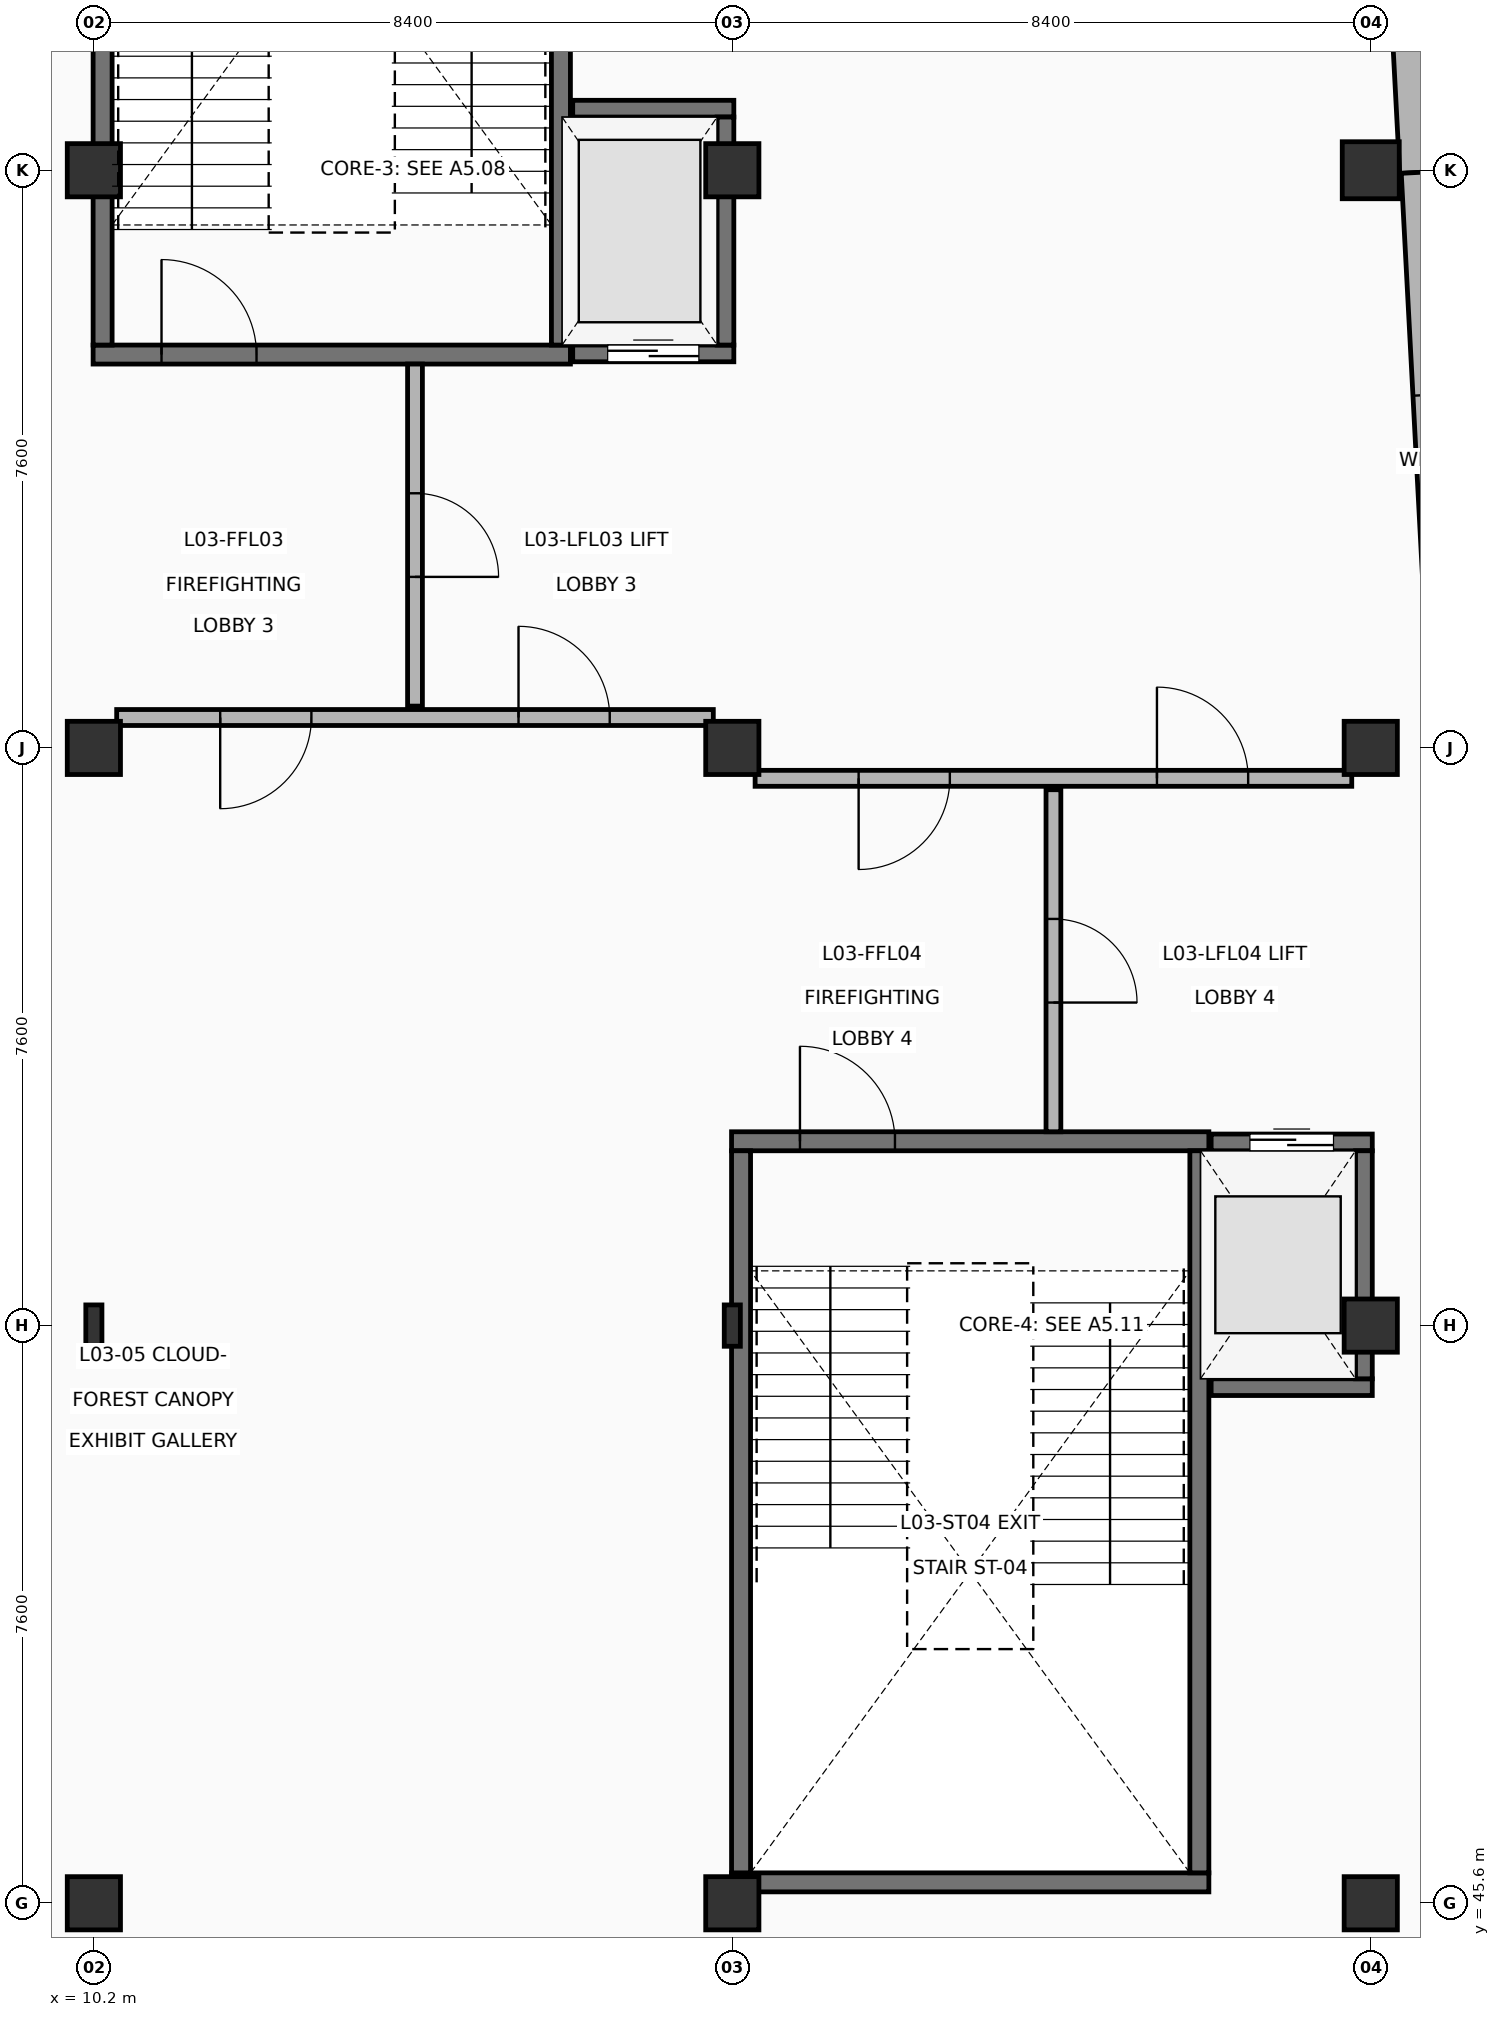
"""IFC4 building model, lengths in metres.
Left out: names, types, materials, properties, quantities, classifications, styles, units other than length and angle.
Written with IfcOpenShell. Run it as: python <this file> out.ifc"""

import sys

from ifc_helpers import new_model, si_unit, direction, frame, frame_2d, origin, origin_2d, place, context, subcontext, project, spatial, rectangle, circle, i_section, extrude, element, fill, save


model = new_model("IFC4")
c1 = context("Model", 3, precision=1e-05, world=origin(), true_north=direction((0.0, 1.0)))
c2 = subcontext(c1, "Body", "Model", "MODEL_VIEW")
j1 = project(units=[si_unit("LENGTHUNIT", "METRE"), si_unit("PLANEANGLEUNIT", "RADIAN")], contexts=[c1])
p1 = place(None, origin())
s1 = spatial("IfcSite", under=j1, at=p1, CompositionType="ELEMENT")
p2 = place(p1, origin())
s2 = spatial("IfcBuilding", under=s1, at=p2, CompositionType="ELEMENT")
p3 = place(p2, frame((0.0, 0.0, 10.5)))
s3 = spatial("IfcBuildingStorey", under=s2, at=p3, CompositionType="ELEMENT", Elevation=10.5)
p4 = place(p3, frame((10.2, 45.6, 0.0), z_axis=(0.0, 0.0, 1.0), x_axis=(1.0, 0.0, 0.0)))
e1 = element("IfcColumn", 1, at=p4, inside=s3, PredefinedType="COLUMN", context=c2, shape_type="SweptSolid", body=[
    extrude(rectangle(XDim=0.7, YDim=0.7, at=origin_2d()), origin(), (0.0, 0.0, 1.0), 4.8),
])
p5 = place(p3, frame((10.2, 53.2, 0.0), z_axis=(0.0, 0.0, 1.0), x_axis=(1.0, 0.0, 0.0)))
e2 = element("IfcColumn", 2, at=p5, inside=s3, PredefinedType="COLUMN", context=c2, shape_type="SweptSolid", body=[
    extrude(i_section(OverallWidth=0.212, OverallDepth=0.544, WebThickness=0.013, FlangeThickness=0.021, at=origin_2d()), origin(), (0.0, 0.0, 1.0), 4.8),
])
for number, where, z_axis, x_axis in (
    (3, (10.2, 60.8, 0.0), (0.0, 0.0, 1.0), (1.0, 0.0, 0.0)),
    (4, (10.2, 68.4, 0.0), (0.0, 0.0, 1.0), (1.0, 0.0, 0.0)),
    (5, (18.6, 45.6, 0.0), (0.0, 0.0, 1.0), (1.0, 0.0, 0.0)),
):
    element("IfcColumn", number, at=place(p3, frame(where, z_axis=z_axis, x_axis=x_axis)), inside=s3, PredefinedType="COLUMN", context=c2, shape_type="SweptSolid", body=[
        extrude(rectangle(XDim=0.7, YDim=0.7, at=origin_2d()), origin(), (0.0, 0.0, 1.0), 4.8),
    ])
p6 = place(p3, frame((18.6, 53.2, 0.0), z_axis=(0.0, 0.0, 1.0), x_axis=(1.0, 0.0, 0.0)))
e6 = element("IfcColumn", 6, at=p6, inside=s3, PredefinedType="COLUMN", context=c2, shape_type="SweptSolid", body=[
    extrude(i_section(OverallWidth=0.212, OverallDepth=0.544, WebThickness=0.013, FlangeThickness=0.021, at=origin_2d()), origin(), (0.0, 0.0, 1.0), 4.8),
])
for number, where, z_axis, x_axis in (
    (7, (18.6, 60.8, 0.0), (0.0, 0.0, 1.0), (1.0, 0.0, 0.0)),
    (8, (18.6, 68.4, 0.0), (0.0, 0.0, 1.0), (1.0, 0.0, 0.0)),
    (9, (27.0, 45.6, 0.0), (0.0, 0.0, 1.0), (1.0, 0.0, 0.0)),
    (10, (27.0, 53.2, 0.0), (0.0, 0.0, 1.0), (1.0, 0.0, 0.0)),
    (11, (27.0, 60.8, 0.0), (0.0, 0.0, 1.0), (1.0, 0.0, 0.0)),
):
    element("IfcColumn", number, at=place(p3, frame(where, z_axis=z_axis, x_axis=x_axis)), inside=s3, PredefinedType="COLUMN", context=c2, shape_type="SweptSolid", body=[
        extrude(rectangle(XDim=0.7, YDim=0.7, at=origin_2d()), origin(), (0.0, 0.0, 1.0), 4.8),
    ])
p7 = place(p3, frame((27.0, 68.4, 0.0), z_axis=(0.0, 0.0, 1.0), x_axis=(1.0, 0.0, 0.0)))
e12 = element("IfcColumn", 12, at=p7, inside=s3, PredefinedType="COLUMN", context=c2, shape_type="SweptSolid", body=[
    extrude(circle(Radius=0.375, at=origin_2d()), origin(), (0.0, 0.0, 1.0), 4.8),
])
p8 = place(p3, frame((27.209, 75.637, 0.0), z_axis=(0.0, 0.0, 1.0), x_axis=(0.05249721114, -0.998621070688, 0.0)))
e13 = element("IfcWall", 13, at=p8, inside=s3, PredefinedType="SOLIDWALL", context=c2, shape_type="SweptSolid", body=[
    extrude(rectangle(XDim=7.278, YDim=0.42, at=frame_2d((3.639, 0.0))), origin(), (0.0, 0.0, 1.0), 4.59),
])
p9 = place(p8, frame((2.839, 0.0, 0.95)))
e14 = element("IfcOpeningElement", 14, at=p9, cuts=e13, PredefinedType="OPENING", context=c2, shape_type="SweptSolid", body=[
    extrude(rectangle(XDim=1.6, YDim=2.05, at=frame_2d((0.8, 1.025))), frame((0.0, 0.22, 0.0), z_axis=(0.0, -1.0, 0.0), x_axis=(1.0, 0.0, 0.0)), (0.0, 0.0, 1.0), 0.44),
])
p10 = place(p3, frame((27.601, 68.37, 0.0), z_axis=(0.0, 0.0, 1.0), x_axis=(0.052545363492, -0.998618538169, 0.0)))
e15 = element("IfcWall", 15, at=p10, inside=s3, PredefinedType="SOLIDWALL", context=c2, shape_type="SweptSolid", body=[
    extrude(rectangle(XDim=7.611, YDim=0.4, at=frame_2d((3.805, 0.0))), origin(), (0.0, 0.0, 1.0), 4.56),
])
p11 = place(p10, frame((2.93, 0.0, 0.95)))
e16 = element("IfcOpeningElement", 16, at=p11, cuts=e15, PredefinedType="OPENING", context=c2, shape_type="SweptSolid", body=[
    extrude(rectangle(XDim=1.75, YDim=2.15, at=frame_2d((0.875, 1.075))), frame((0.0, 0.21, 0.0), z_axis=(0.0, -1.0, 0.0), x_axis=(1.0, 0.0, 0.0)), (0.0, 0.0, 1.0), 0.42),
])
p12 = place(p3, frame((10.19, 65.975, 0.0), z_axis=(0.0, 0.0, 1.0), x_axis=(1.0, 0.0, 0.0)))
e17 = element("IfcWall", 17, at=p12, inside=s3, PredefinedType="SHEAR", context=c2, shape_type="SweptSolid", body=[
    extrude(rectangle(XDim=6.28, YDim=0.25, at=frame_2d((3.14, 0.0))), origin(), (0.0, 0.0, 1.0), 4.59),
])
p13 = place(p12, frame((0.9, 0.0, 0.0)))
e18 = element("IfcOpeningElement", 18, at=p13, cuts=e17, PredefinedType="OPENING", context=c2, shape_type="SweptSolid", body=[
    extrude(rectangle(XDim=1.25, YDim=2.2, at=frame_2d((0.625, 1.1))), frame((0.0, 0.135, 0.0), z_axis=(0.0, -1.0, 0.0), x_axis=(1.0, 0.0, 0.0)), (0.0, 0.0, 1.0), 0.27),
])
for number, where, z_axis, x_axis in (
    (19, (10.315, 66.1, 0.0), (0.0, 0.0, 1.0), (0.0, 1.0, 0.0)),
    (20, (16.345, 66.1, 0.0), (0.0, 0.0, 1.0), (0.0, 1.0, 0.0)),
):
    element("IfcWall", number, at=place(p3, frame(where, z_axis=z_axis, x_axis=x_axis)), inside=s3, PredefinedType="SHEAR", context=c2, shape_type="SweptSolid", body=[
        extrude(rectangle(XDim=9.5, YDim=0.25, at=frame_2d((4.75, 0.0))), origin(), (0.0, 0.0, 1.0), 4.59),
    ])
p14 = place(p3, frame((16.5, 65.99, 0.0), z_axis=(0.0, 0.0, 1.0), x_axis=(1.0, 0.0, 0.0)))
e21 = element("IfcWall", 21, at=p14, inside=s3, PredefinedType="SHEAR", context=c2, shape_type="SweptSolid", body=[
    extrude(rectangle(XDim=2.12, YDim=0.22, at=frame_2d((1.06, 0.0))), origin(), (0.0, 0.0, 1.0), 4.59),
])
p15 = place(p14, frame((0.46, 0.0, 0.0)))
e22 = element("IfcOpeningElement", 22, at=p15, cuts=e21, PredefinedType="OPENING", context=c2, shape_type="SweptSolid", body=[
    extrude(rectangle(XDim=1.2, YDim=2.2, at=frame_2d((0.6, 1.1))), frame((0.0, 0.12, 0.0), z_axis=(0.0, -1.0, 0.0), x_axis=(1.0, 0.0, 0.0)), (0.0, 0.0, 1.0), 0.24),
])
p16 = place(p3, frame((16.5, 69.21, 0.0), z_axis=(0.0, 0.0, 1.0), x_axis=(1.0, 0.0, 0.0)))
e23 = element("IfcWall", 23, at=p16, inside=s3, PredefinedType="SHEAR", context=c2, shape_type="SweptSolid", body=[
    extrude(rectangle(XDim=2.12, YDim=0.22, at=frame_2d((1.06, 0.0))), origin(), (0.0, 0.0, 1.0), 4.59),
])
p17 = place(p3, frame((18.51, 66.1, 0.0), z_axis=(0.0, 0.0, 1.0), x_axis=(0.0, 1.0, 0.0)))
e24 = element("IfcWall", 24, at=p17, inside=s3, PredefinedType="SHEAR", context=c2, shape_type="SweptSolid", body=[
    extrude(rectangle(XDim=3.0, YDim=0.22, at=frame_2d((1.5, 0.0))), origin(), (0.0, 0.0, 1.0), 4.59),
])
p18 = place(p3, frame((10.5, 61.2, 0.0), z_axis=(0.0, 0.0, 1.0), x_axis=(1.0, 0.0, 0.0)))
e25 = element("IfcWall", 25, at=p18, inside=s3, PredefinedType="PARTITIONING", context=c2, shape_type="SweptSolid", body=[
    extrude(rectangle(XDim=7.85, YDim=0.21, at=frame_2d((3.925, 0.0))), origin(), (0.0, 0.0, 1.0), 4.59),
])
p19 = place(p18, frame((1.362, 0.0, 0.0)))
e26 = element("IfcOpeningElement", 26, at=p19, cuts=e25, PredefinedType="OPENING", context=c2, shape_type="SweptSolid", body=[
    extrude(rectangle(XDim=1.2, YDim=2.2, at=frame_2d((0.6, 1.1))), frame((0.0, 0.115, 0.0), z_axis=(0.0, -1.0, 0.0), x_axis=(1.0, 0.0, 0.0)), (0.0, 0.0, 1.0), 0.23),
])
p20 = place(p18, frame((5.287, 0.0, 0.0)))
e27 = element("IfcOpeningElement", 27, at=p20, cuts=e25, PredefinedType="OPENING", context=c2, shape_type="SweptSolid", body=[
    extrude(rectangle(XDim=1.2, YDim=2.2, at=frame_2d((0.6, 1.1))), frame((0.0, 0.115, 0.0), z_axis=(0.0, -1.0, 0.0), x_axis=(1.0, 0.0, 0.0)), (0.0, 0.0, 1.0), 0.23),
])
p21 = place(p3, frame((14.425, 61.35, 0.0), z_axis=(0.0, 0.0, 1.0), x_axis=(0.0, 1.0, 0.0)))
e28 = element("IfcWall", 28, at=p21, inside=s3, PredefinedType="PARTITIONING", context=c2, shape_type="SweptSolid", body=[
    extrude(rectangle(XDim=4.5, YDim=0.195, at=frame_2d((2.25, 0.0))), origin(), (0.0, 0.0, 1.0), 4.59),
])
p22 = place(p21, frame((1.7, 0.0, 0.0)))
e29 = element("IfcOpeningElement", 29, at=p22, cuts=e28, PredefinedType="OPENING", context=c2, shape_type="SweptSolid", body=[
    extrude(rectangle(XDim=1.1, YDim=2.15, at=frame_2d((0.55, 1.075))), frame((0.0, 0.107, 0.0), z_axis=(0.0, -1.0, 0.0), x_axis=(1.0, 0.0, 0.0)), (0.0, 0.0, 1.0), 0.215),
])
p23 = place(p3, frame((18.59, 45.875, 0.0), z_axis=(0.0, 0.0, 1.0), x_axis=(1.0, 0.0, 0.0)))
e30 = element("IfcWall", 30, at=p23, inside=s3, PredefinedType="SHEAR", context=c2, shape_type="SweptSolid", body=[
    extrude(rectangle(XDim=6.28, YDim=0.25, at=frame_2d((3.14, 0.0))), origin(), (0.0, 0.0, 1.0), 4.59),
])
p24 = place(p3, frame((18.59, 55.625, 0.0), z_axis=(0.0, 0.0, 1.0), x_axis=(1.0, 0.0, 0.0)))
e31 = element("IfcWall", 31, at=p24, inside=s3, PredefinedType="SHEAR", context=c2, shape_type="SweptSolid", body=[
    extrude(rectangle(XDim=6.28, YDim=0.25, at=frame_2d((3.14, 0.0))), origin(), (0.0, 0.0, 1.0), 4.59),
])
p25 = place(p24, frame((0.9, 0.0, 0.0)))
e32 = element("IfcOpeningElement", 32, at=p25, cuts=e31, PredefinedType="OPENING", context=c2, shape_type="SweptSolid", body=[
    extrude(rectangle(XDim=1.25, YDim=2.2, at=frame_2d((0.625, 1.1))), frame((0.0, 0.135, 0.0), z_axis=(0.0, -1.0, 0.0), x_axis=(1.0, 0.0, 0.0)), (0.0, 0.0, 1.0), 0.27),
])
for number, where, z_axis, x_axis in (
    (33, (18.715, 46.0, 0.0), (0.0, 0.0, 1.0), (0.0, 1.0, 0.0)),
    (34, (24.745, 46.0, 0.0), (0.0, 0.0, 1.0), (0.0, 1.0, 0.0)),
):
    element("IfcWall", number, at=place(p3, frame(where, z_axis=z_axis, x_axis=x_axis)), inside=s3, PredefinedType="SHEAR", context=c2, shape_type="SweptSolid", body=[
        extrude(rectangle(XDim=9.5, YDim=0.25, at=frame_2d((4.75, 0.0))), origin(), (0.0, 0.0, 1.0), 4.59),
    ])
p26 = place(p3, frame((24.9, 52.39, 0.0), z_axis=(0.0, 0.0, 1.0), x_axis=(1.0, 0.0, 0.0)))
e35 = element("IfcWall", 35, at=p26, inside=s3, PredefinedType="SHEAR", context=c2, shape_type="SweptSolid", body=[
    extrude(rectangle(XDim=2.12, YDim=0.22, at=frame_2d((1.06, 0.0))), origin(), (0.0, 0.0, 1.0), 4.59),
])
p27 = place(p3, frame((24.9, 55.61, 0.0), z_axis=(0.0, 0.0, 1.0), x_axis=(1.0, 0.0, 0.0)))
e36 = element("IfcWall", 36, at=p27, inside=s3, PredefinedType="SHEAR", context=c2, shape_type="SweptSolid", body=[
    extrude(rectangle(XDim=2.12, YDim=0.22, at=frame_2d((1.06, 0.0))), origin(), (0.0, 0.0, 1.0), 4.59),
])
p28 = place(p27, frame((0.51, 0.0, 0.0)))
e37 = element("IfcOpeningElement", 37, at=p28, cuts=e36, PredefinedType="OPENING", context=c2, shape_type="SweptSolid", body=[
    extrude(rectangle(XDim=1.1, YDim=2.15, at=frame_2d((0.55, 1.075))), frame((0.0, 0.12, 0.0), z_axis=(0.0, -1.0, 0.0), x_axis=(1.0, 0.0, 0.0)), (0.0, 0.0, 1.0), 0.24),
])
p29 = place(p3, frame((26.91, 52.5, 0.0), z_axis=(0.0, 0.0, 1.0), x_axis=(0.0, 1.0, 0.0)))
e38 = element("IfcWall", 38, at=p29, inside=s3, PredefinedType="SHEAR", context=c2, shape_type="SweptSolid", body=[
    extrude(rectangle(XDim=3.0, YDim=0.22, at=frame_2d((1.5, 0.0))), origin(), (0.0, 0.0, 1.0), 4.59),
])
p30 = place(p3, frame((18.9, 60.4, 0.0), z_axis=(0.0, 0.0, 1.0), x_axis=(1.0, 0.0, 0.0)))
e39 = element("IfcWall", 39, at=p30, inside=s3, PredefinedType="PARTITIONING", context=c2, shape_type="SweptSolid", body=[
    extrude(rectangle(XDim=7.85, YDim=0.21, at=frame_2d((3.925, 0.0))), origin(), (0.0, 0.0, 1.0), 4.59),
])
p31 = place(p30, frame((1.362, 0.0, 0.0)))
e40 = element("IfcOpeningElement", 40, at=p31, cuts=e39, PredefinedType="OPENING", context=c2, shape_type="SweptSolid", body=[
    extrude(rectangle(XDim=1.2, YDim=2.2, at=frame_2d((0.6, 1.1))), frame((0.0, 0.115, 0.0), z_axis=(0.0, -1.0, 0.0), x_axis=(1.0, 0.0, 0.0)), (0.0, 0.0, 1.0), 0.23),
])
p32 = place(p30, frame((5.287, 0.0, 0.0)))
e41 = element("IfcOpeningElement", 41, at=p32, cuts=e39, PredefinedType="OPENING", context=c2, shape_type="SweptSolid", body=[
    extrude(rectangle(XDim=1.2, YDim=2.2, at=frame_2d((0.6, 1.1))), frame((0.0, 0.115, 0.0), z_axis=(0.0, -1.0, 0.0), x_axis=(1.0, 0.0, 0.0)), (0.0, 0.0, 1.0), 0.23),
])
p33 = place(p3, frame((22.825, 55.75, 0.0), z_axis=(0.0, 0.0, 1.0), x_axis=(0.0, 1.0, 0.0)))
e42 = element("IfcWall", 42, at=p33, inside=s3, PredefinedType="PARTITIONING", context=c2, shape_type="SweptSolid", body=[
    extrude(rectangle(XDim=4.5, YDim=0.195, at=frame_2d((2.25, 0.0))), origin(), (0.0, 0.0, 1.0), 4.59),
])
p34 = place(p33, frame((1.7, 0.0, 0.0)))
e43 = element("IfcOpeningElement", 43, at=p34, cuts=e42, PredefinedType="OPENING", context=c2, shape_type="SweptSolid", body=[
    extrude(rectangle(XDim=1.1, YDim=2.15, at=frame_2d((0.55, 1.075))), frame((0.0, 0.107, 0.0), z_axis=(0.0, -1.0, 0.0), x_axis=(1.0, 0.0, 0.0)), (0.0, 0.0, 1.0), 0.215),
])
p35 = place(p13, origin())
e44 = element("IfcDoor", 44, at=p35, inside=s3, OperationType="SINGLE_SWING_LEFT", PredefinedType="DOOR", context=c2, shape_type="SweptSolid", body=[
    extrude(rectangle(XDim=1.25, YDim=2.2, at=frame_2d((0.625, 1.1))), frame((0.0, 0.025, 0.0), z_axis=(0.0, -1.0, 0.0), x_axis=(1.0, 0.0, 0.0)), (0.0, 0.0, 1.0), 0.05),
])
fill(e18, e44)
p36 = place(p15, origin())
e45 = element("IfcDoor", 45, at=p36, inside=s3, OperationType="DOUBLE_DOOR_SLIDING", PredefinedType="DOOR", context=c2, shape_type="SweptSolid", body=[
    extrude(rectangle(XDim=1.2, YDim=2.2, at=frame_2d((0.6, 1.1))), frame((0.0, 0.025, 0.0), z_axis=(0.0, -1.0, 0.0), x_axis=(1.0, 0.0, 0.0)), (0.0, 0.0, 1.0), 0.05),
])
fill(e22, e45)
p37 = place(p19, origin())
e46 = element("IfcDoor", 46, at=p37, inside=s3, OperationType="SINGLE_SWING_RIGHT", PredefinedType="DOOR", context=c2, shape_type="SweptSolid", body=[
    extrude(rectangle(XDim=1.2, YDim=2.2, at=frame_2d((0.6, 1.1))), frame((0.0, 0.025, 0.0), z_axis=(0.0, -1.0, 0.0), x_axis=(1.0, 0.0, 0.0)), (0.0, 0.0, 1.0), 0.05),
])
fill(e26, e46)
p38 = place(p20, origin())
e47 = element("IfcDoor", 47, at=p38, inside=s3, OperationType="SINGLE_SWING_LEFT", PredefinedType="DOOR", context=c2, shape_type="SweptSolid", body=[
    extrude(rectangle(XDim=1.2, YDim=2.2, at=frame_2d((0.6, 1.1))), frame((0.0, 0.025, 0.0), z_axis=(0.0, -1.0, 0.0), x_axis=(1.0, 0.0, 0.0)), (0.0, 0.0, 1.0), 0.05),
])
fill(e27, e47)
p39 = place(p22, origin())
e48 = element("IfcDoor", 48, at=p39, inside=s3, OperationType="SINGLE_SWING_RIGHT", PredefinedType="DOOR", context=c2, shape_type="SweptSolid", body=[
    extrude(rectangle(XDim=1.1, YDim=2.15, at=frame_2d((0.55, 1.075))), frame((0.0, 0.025, 0.0), z_axis=(0.0, -1.0, 0.0), x_axis=(1.0, 0.0, 0.0)), (0.0, 0.0, 1.0), 0.05),
])
fill(e29, e48)
p40 = place(p25, origin())
e49 = element("IfcDoor", 49, at=p40, inside=s3, OperationType="SINGLE_SWING_LEFT", PredefinedType="DOOR", context=c2, shape_type="SweptSolid", body=[
    extrude(rectangle(XDim=1.25, YDim=2.2, at=frame_2d((0.625, 1.1))), frame((0.0, 0.025, 0.0), z_axis=(0.0, -1.0, 0.0), x_axis=(1.0, 0.0, 0.0)), (0.0, 0.0, 1.0), 0.05),
])
fill(e32, e49)
p41 = place(p28, origin())
e50 = element("IfcDoor", 50, at=p41, inside=s3, OperationType="DOUBLE_DOOR_SLIDING", PredefinedType="DOOR", context=c2, shape_type="SweptSolid", body=[
    extrude(rectangle(XDim=1.1, YDim=2.15, at=frame_2d((0.55, 1.075))), frame((0.0, 0.025, 0.0), z_axis=(0.0, -1.0, 0.0), x_axis=(1.0, 0.0, 0.0)), (0.0, 0.0, 1.0), 0.05),
])
fill(e37, e50)
p42 = place(p31, origin())
e51 = element("IfcDoor", 51, at=p42, inside=s3, OperationType="SINGLE_SWING_RIGHT", PredefinedType="DOOR", context=c2, shape_type="SweptSolid", body=[
    extrude(rectangle(XDim=1.2, YDim=2.2, at=frame_2d((0.6, 1.1))), frame((0.0, 0.025, 0.0), z_axis=(0.0, -1.0, 0.0), x_axis=(1.0, 0.0, 0.0)), (0.0, 0.0, 1.0), 0.05),
])
fill(e40, e51)
p43 = place(p32, origin())
e52 = element("IfcDoor", 52, at=p43, inside=s3, OperationType="SINGLE_SWING_LEFT", PredefinedType="DOOR", context=c2, shape_type="SweptSolid", body=[
    extrude(rectangle(XDim=1.2, YDim=2.2, at=frame_2d((0.6, 1.1))), frame((0.0, 0.025, 0.0), z_axis=(0.0, -1.0, 0.0), x_axis=(1.0, 0.0, 0.0)), (0.0, 0.0, 1.0), 0.05),
])
fill(e41, e52)
p44 = place(p34, origin())
e53 = element("IfcDoor", 53, at=p44, inside=s3, OperationType="SINGLE_SWING_RIGHT", PredefinedType="DOOR", context=c2, shape_type="SweptSolid", body=[
    extrude(rectangle(XDim=1.1, YDim=2.15, at=frame_2d((0.55, 1.075))), frame((0.0, 0.025, 0.0), z_axis=(0.0, -1.0, 0.0), x_axis=(1.0, 0.0, 0.0)), (0.0, 0.0, 1.0), 0.05),
])
fill(e43, e53)
save(model, sys.argv[1])
